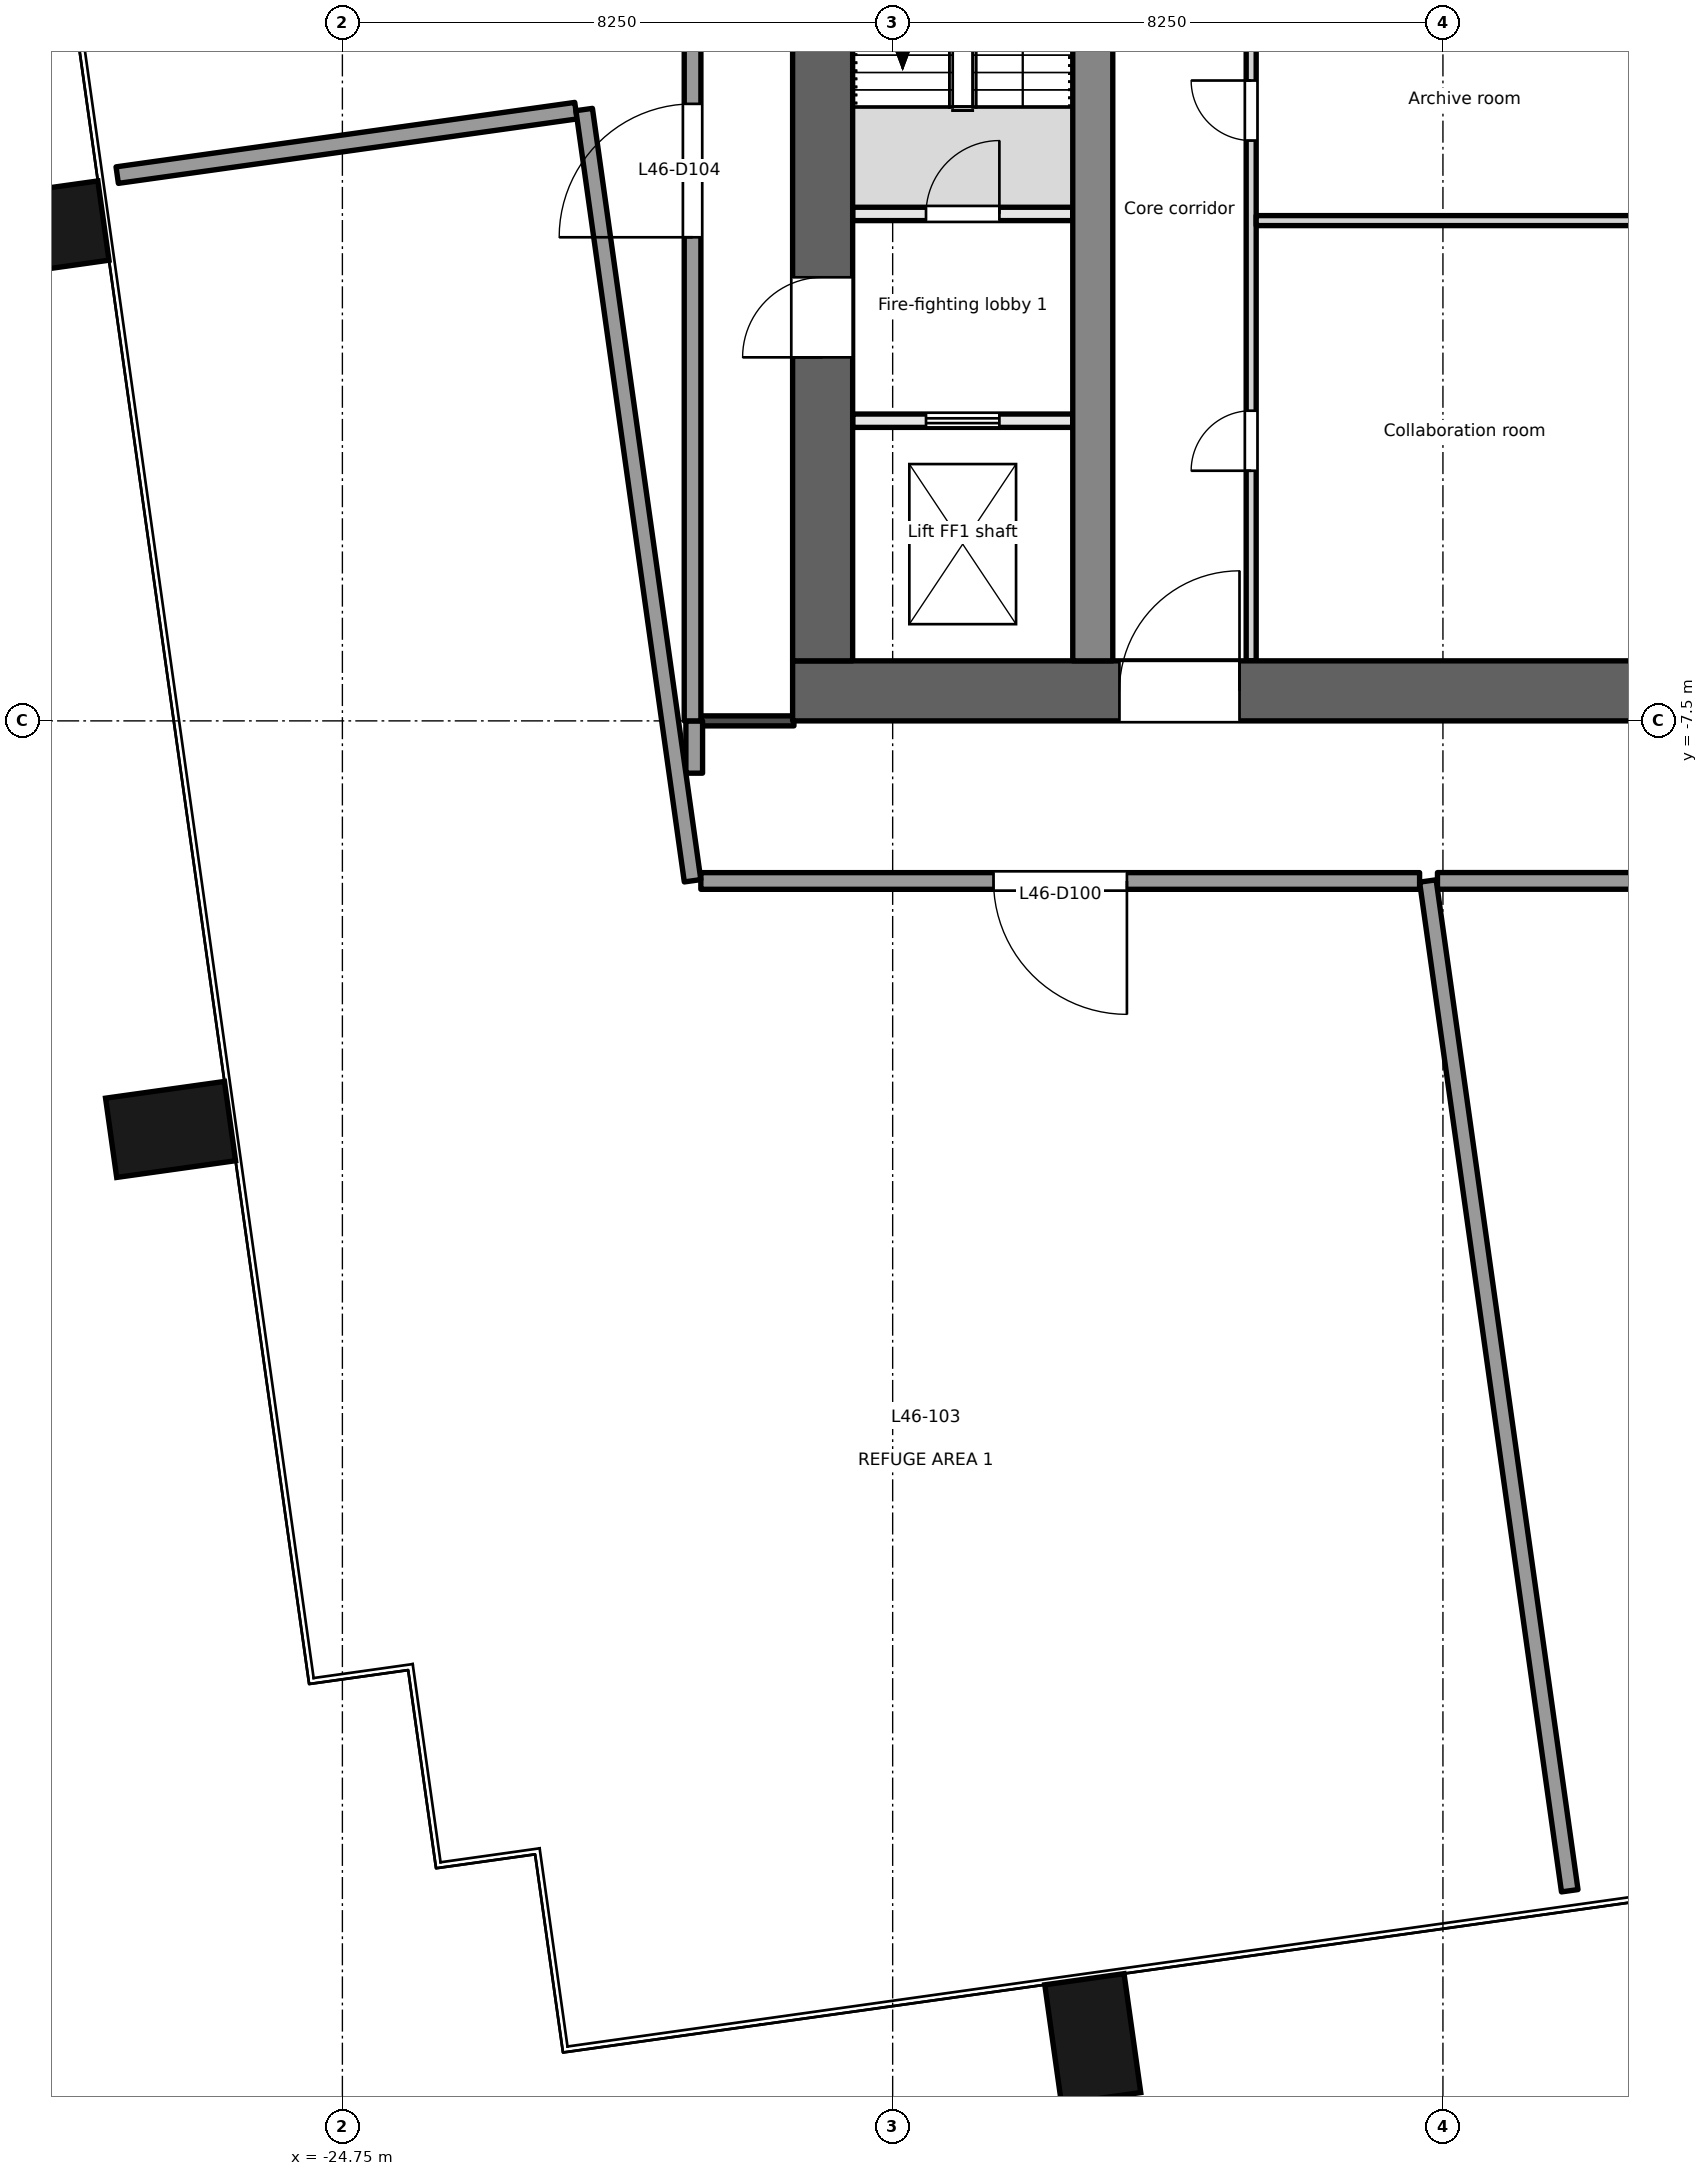
"""IFC4 building model, lengths in metres.
Left out: names, types, materials, properties, quantities, classifications, styles, units other than length and angle.
Written with IfcOpenShell. Run it as: python <this file> out.ifc"""

import sys

from ifc_helpers import new_model, si_unit, direction, frame, frame_2d, origin, origin_2d, place, context, subcontext, project, spatial, rectangle, extrude, element, fill, save


model = new_model("IFC4")
c1 = context("Model", 3, precision=1e-05, world=origin(), true_north=direction((0.0, 1.0)))
c2 = subcontext(c1, "Body", "Model", "MODEL_VIEW")
j1 = project(units=[si_unit("LENGTHUNIT", "METRE"), si_unit("PLANEANGLEUNIT", "RADIAN")], contexts=[c1])
p1 = place(None, origin())
s1 = spatial("IfcSite", under=j1, at=p1, CompositionType="ELEMENT")
p2 = place(p1, origin())
s2 = spatial("IfcBuilding", under=s1, at=p2, CompositionType="ELEMENT")
p3 = place(p2, frame((0.0, 0.0, 199.7)))
s3 = spatial("IfcBuildingStorey", under=s2, at=p3, CompositionType="ELEMENT", Elevation=199.7)
for number, where, z_axis, x_axis in (
    (1, (-13.5, -27.256, -0.2), (0.0, 0.0, 1.0), (0.99, 0.139, 0.0)),
    (2, (-27.326, -13.625, -0.2), (0.0, 0.0, 1.0), (-0.139, 0.99, 0.0)),
    (3, (-29.224, -0.125, -0.2), (0.0, 0.0, 1.0), (-0.139, 0.99, 0.0)),
):
    element("IfcColumn", number, at=place(p3, frame(where, z_axis=z_axis, x_axis=x_axis)), inside=s3, PredefinedType="COLUMN", context=c2, shape_type="SweptSolid", body=[
        extrude(rectangle(XDim=1.2, YDim=1.8, at=origin_2d()), origin(), (0.0, 0.0, 1.0), 8.4),
    ])
p4 = place(p3, frame((-18.0, -7.05, -0.2), z_axis=(0.0, 0.0, 1.0), x_axis=(1.0, 0.0, 0.0)))
e4 = element("IfcWall", 4, at=p4, inside=s3, PredefinedType="SHEAR", context=c2, shape_type="SweptSolid", body=[
    extrude(rectangle(XDim=36.0, YDim=0.9, at=frame_2d((18.0, 0.0))), origin(), (0.0, 0.0, 1.0), 8.4),
])
p5 = place(p4, frame((4.9, 0.0, 0.2)))
e5 = element("IfcOpeningElement", 5, at=p5, cuts=e4, PredefinedType="OPENING", context=c2, shape_type="SweptSolid", body=[
    extrude(rectangle(XDim=1.8, YDim=2.1, at=frame_2d((0.9, 1.05))), frame((0.0, 0.46, 0.0), z_axis=(0.0, -1.0, 0.0), x_axis=(1.0, 0.0, 0.0)), (0.0, 0.0, 1.0), 0.921),
])
p6 = place(p4, frame((17.4, 0.0, 0.2)))
e6 = element("IfcOpeningElement", 6, at=p6, cuts=e4, PredefinedType="OPENING", context=c2, shape_type="SweptSolid", body=[
    extrude(rectangle(XDim=1.2, YDim=2.1, at=frame_2d((0.6, 1.05))), frame((0.0, 0.46, 0.0), z_axis=(0.0, -1.0, 0.0), x_axis=(1.0, 0.0, 0.0)), (0.0, 0.0, 1.0), 0.921),
])
p7 = place(p4, frame((26.1, 0.0, 0.2)))
e7 = element("IfcOpeningElement", 7, at=p7, cuts=e4, PredefinedType="OPENING", context=c2, shape_type="SweptSolid", body=[
    extrude(rectangle(XDim=2.4, YDim=2.1, at=frame_2d((1.2, 1.05))), frame((0.0, 0.46, 0.0), z_axis=(0.0, -1.0, 0.0), x_axis=(1.0, 0.0, 0.0)), (0.0, 0.0, 1.0), 0.921),
])
p8 = place(p3, frame((-17.55, -6.6, -0.2), z_axis=(0.0, 0.0, 1.0), x_axis=(0.0, 1.0, 0.0)))
e8 = element("IfcWall", 8, at=p8, inside=s3, PredefinedType="SHEAR", context=c2, shape_type="SweptSolid", body=[
    extrude(rectangle(XDim=13.2, YDim=0.9, at=frame_2d((6.6, 0.0))), origin(), (0.0, 0.0, 1.0), 8.4),
])
p9 = place(p8, frame((4.55, 0.0, 0.2)))
e9 = element("IfcOpeningElement", 9, at=p9, cuts=e8, PredefinedType="OPENING", context=c2, shape_type="SweptSolid", body=[
    extrude(rectangle(XDim=1.2, YDim=2.1, at=frame_2d((0.6, 1.05))), frame((0.0, 0.46, 0.0), z_axis=(0.0, -1.0, 0.0), x_axis=(1.0, 0.0, 0.0)), (0.0, 0.0, 1.0), 0.921),
])
p10 = place(p3, frame((-13.5, -6.6, -0.2), z_axis=(0.0, 0.0, 1.0), x_axis=(0.0, 1.0, 0.0)))
e10 = element("IfcWall", 10, at=p10, inside=s3, PredefinedType="SHEAR", context=c2, shape_type="SweptSolid", body=[
    extrude(rectangle(XDim=13.2, YDim=0.6, at=frame_2d((6.6, 0.0))), origin(), (0.0, 0.0, 1.0), 8.4),
])
p11 = place(p3, frame((-17.1, -3.0, 0.0), z_axis=(0.0, 0.0, 1.0), x_axis=(1.0, 0.0, 0.0)))
e11 = element("IfcWall", 11, at=p11, inside=s3, PredefinedType="PARTITIONING", context=c2, shape_type="SweptSolid", body=[
    extrude(rectangle(XDim=3.3, YDim=0.2, at=frame_2d((1.65, 0.0))), origin(), (0.0, 0.0, 1.0), 8.2),
])
p12 = place(p11, frame((1.1, 0.0, 0.0)))
e12 = element("IfcOpeningElement", 12, at=p12, cuts=e11, PredefinedType="OPENING", context=c2, shape_type="SweptSolid", body=[
    extrude(rectangle(XDim=1.1, YDim=2.1, at=frame_2d((0.55, 1.05))), frame((0.0, 0.111, 0.0), z_axis=(0.0, -1.0, 0.0), x_axis=(1.0, 0.0, 0.0)), (0.0, 0.0, 1.0), 0.221),
])
p13 = place(p3, frame((-17.1, 0.1, 0.0), z_axis=(0.0, 0.0, 1.0), x_axis=(1.0, 0.0, 0.0)))
e13 = element("IfcWall", 13, at=p13, inside=s3, PredefinedType="PARTITIONING", context=c2, shape_type="SweptSolid", body=[
    extrude(rectangle(XDim=3.3, YDim=0.2, at=frame_2d((1.65, 0.0))), origin(), (0.0, 0.0, 1.0), 8.2),
])
p14 = place(p13, frame((1.1, 0.0, 0.0)))
e14 = element("IfcOpeningElement", 14, at=p14, cuts=e13, PredefinedType="OPENING", context=c2, shape_type="SweptSolid", body=[
    extrude(rectangle(XDim=1.1, YDim=2.1, at=frame_2d((0.55, 1.05))), frame((0.0, 0.111, 0.0), z_axis=(0.0, -1.0, 0.0), x_axis=(1.0, 0.0, 0.0)), (0.0, 0.0, 1.0), 0.221),
])
p15 = place(p3, frame((-11.125, -6.6, 0.0), z_axis=(0.0, 0.0, 1.0), x_axis=(0.0, 1.0, 0.0)))
e15 = element("IfcWall", 15, at=p15, inside=s3, PredefinedType="PARTITIONING", context=c2, shape_type="SweptSolid", body=[
    extrude(rectangle(XDim=13.2, YDim=0.15, at=frame_2d((6.6, 0.0))), origin(), (0.0, 0.0, 1.0), 8.2),
])
p16 = place(p15, frame((2.85, 0.0, 0.0)))
e16 = element("IfcOpeningElement", 16, at=p16, cuts=e15, PredefinedType="OPENING", context=c2, shape_type="SweptSolid", body=[
    extrude(rectangle(XDim=0.9, YDim=2.1, at=frame_2d((0.45, 1.05))), frame((0.0, 0.085, 0.0), z_axis=(0.0, -1.0, 0.0), x_axis=(1.0, 0.0, 0.0)), (0.0, 0.0, 1.0), 0.171),
])
p17 = place(p15, frame((7.8, 0.0, 0.0)))
e17 = element("IfcOpeningElement", 17, at=p17, cuts=e15, PredefinedType="OPENING", context=c2, shape_type="SweptSolid", body=[
    extrude(rectangle(XDim=0.9, YDim=2.1, at=frame_2d((0.45, 1.05))), frame((0.0, 0.085, 0.0), z_axis=(0.0, -1.0, 0.0), x_axis=(1.0, 0.0, 0.0)), (0.0, 0.0, 1.0), 0.171),
])
p18 = place(p15, frame((11.1, 0.0, 0.0)))
e18 = element("IfcOpeningElement", 18, at=p18, cuts=e15, PredefinedType="OPENING", context=c2, shape_type="SweptSolid", body=[
    extrude(rectangle(XDim=0.9, YDim=2.1, at=frame_2d((0.45, 1.05))), frame((0.0, 0.085, 0.0), z_axis=(0.0, -1.0, 0.0), x_axis=(1.0, 0.0, 0.0)), (0.0, 0.0, 1.0), 0.171),
])
p19 = place(p3, frame((-11.05, 0.0, 0.0), z_axis=(0.0, 0.0, 1.0), x_axis=(1.0, 0.0, 0.0)))
e19 = element("IfcWall", 19, at=p19, inside=s3, PredefinedType="PARTITIONING", context=c2, shape_type="SweptSolid", body=[
    extrude(rectangle(XDim=6.25, YDim=0.15, at=frame_2d((3.125, 0.0))), origin(), (0.0, 0.0, 1.0), 8.2),
])
p20 = place(p3, frame((-19.375, -7.5, 0.0), z_axis=(0.0, 0.0, 1.0), x_axis=(1.0, 0.0, 0.0)))
e20 = element("IfcWall", 20, at=p20, inside=s3, PredefinedType="PARTITIONING", context=c2, shape_type="SweptSolid", body=[
    extrude(rectangle(XDim=1.395, YDim=0.15, at=frame_2d((0.698, 0.0))), origin(), (0.0, 0.0, 1.0), 8.2),
])
p21 = place(p3, frame((-8.6, -9.9, 0.0), z_axis=(0.0, 0.0, 1.0), x_axis=(-1.0, 0.0, 0.0)))
e21 = element("IfcWall", 21, at=p21, inside=s3, PredefinedType="PARTITIONING", context=c2, shape_type="SweptSolid", body=[
    extrude(rectangle(XDim=10.776, YDim=0.25, at=frame_2d((5.388, 0.0))), origin(), (0.0, 0.0, 1.0), 7.3),
])
p22 = place(p21, frame((4.388, 0.0, 0.0)))
e22 = element("IfcOpeningElement", 22, at=p22, cuts=e21, PredefinedType="OPENING", context=c2, shape_type="SweptSolid", body=[
    extrude(rectangle(XDim=2.0, YDim=2.1, at=frame_2d((1.0, 1.05))), frame((0.0, 0.135, 0.0), z_axis=(0.0, -1.0, 0.0), x_axis=(1.0, 0.0, 0.0)), (0.0, 0.0, 1.0), 0.271),
])
p23 = place(p3, frame((0.705, -9.899, 0.0), z_axis=(0.0, 0.0, 1.0), x_axis=(-1.0, 0.0, 0.0)))
e23 = element("IfcWall", 23, at=p23, inside=s3, PredefinedType="PARTITIONING", context=c2, shape_type="SweptSolid", body=[
    extrude(rectangle(XDim=9.037, YDim=0.25, at=frame_2d((4.519, 0.0))), origin(), (0.0, 0.0, 1.0), 7.3),
])
p24 = place(p23, frame((3.519, 0.0, 0.0)))
e24 = element("IfcOpeningElement", 24, at=p24, cuts=e23, PredefinedType="OPENING", context=c2, shape_type="SweptSolid", body=[
    extrude(rectangle(XDim=2.0, YDim=2.1, at=frame_2d((1.0, 1.05))), frame((0.0, 0.135, 0.0), z_axis=(0.0, -1.0, 0.0), x_axis=(1.0, 0.0, 0.0)), (0.0, 0.0, 1.0), 0.271),
])
p25 = place(p3, frame((-19.475, -8.284, 0.0), z_axis=(0.0, 0.0, 1.0), x_axis=(0.0, 1.0, 0.0)))
e25 = element("IfcWall", 25, at=p25, inside=s3, PredefinedType="PARTITIONING", context=c2, shape_type="SweptSolid", body=[
    extrude(rectangle(XDim=0.784, YDim=0.25, at=frame_2d((0.392, 0.0))), origin(), (0.0, 0.0, 1.0), 8.2),
])
p26 = place(p3, frame((-19.5, -7.5, 0.0), z_axis=(0.0, 0.0, 1.0), x_axis=(0.0, 1.0, 0.0)))
e26 = element("IfcWall", 26, at=p26, inside=s3, PredefinedType="PARTITIONING", context=c2, shape_type="SweptSolid", body=[
    extrude(rectangle(XDim=16.5, YDim=0.25, at=frame_2d((8.25, 0.0))), origin(), (0.0, 0.0, 1.0), 6.15),
])
p27 = place(p26, frame((7.25, 0.0, 0.0)))
e27 = element("IfcOpeningElement", 27, at=p27, cuts=e26, PredefinedType="OPENING", context=c2, shape_type="SweptSolid", body=[
    extrude(rectangle(XDim=2.0, YDim=2.1, at=frame_2d((1.0, 1.05))), frame((0.0, 0.135, 0.0), z_axis=(0.0, -1.0, 0.0), x_axis=(1.0, 0.0, 0.0)), (0.0, 0.0, 1.0), 0.271),
])
p28 = place(p3, frame((-8.476, -9.9, 0.0), z_axis=(0.0, 0.0, 1.0), x_axis=(0.139135905406, -0.990273295523, 0.0)))
e28 = element("IfcWall", 28, at=p28, inside=s3, PredefinedType="PARTITIONING", context=c2, shape_type="SweptSolid", body=[
    extrude(rectangle(XDim=15.287, YDim=0.25, at=frame_2d((7.644, 0.0))), origin(), (0.0, 0.0, 1.0), 8.2),
])
p29 = place(p3, frame((-28.126, 0.682, 0.0), z_axis=(0.0, 0.0, 1.0), x_axis=(0.990276566438, 0.13911262331, 0.0)))
e29 = element("IfcWall", 29, at=p29, inside=s3, PredefinedType="PARTITIONING", context=c2, shape_type="SweptSolid", body=[
    extrude(rectangle(XDim=6.945, YDim=0.25, at=frame_2d((3.472, 0.0))), origin(), (0.0, 0.0, 1.0), 7.1),
])
p30 = place(p3, frame((-21.125, 1.665, 0.0), z_axis=(0.0, 0.0, 1.0), x_axis=(0.139178578933, -0.990267298847, 0.0)))
e30 = element("IfcWall", 30, at=p30, inside=s3, PredefinedType="PARTITIONING", context=c2, shape_type="SweptSolid", body=[
    extrude(rectangle(XDim=11.676, YDim=0.25, at=frame_2d((5.838, 0.0))), origin(), (0.0, 0.0, 1.0), 6.15),
])
p31 = place(p12, origin())
e31 = element("IfcDoor", 31, at=p31, inside=s3, OperationType="DOUBLE_DOOR_SLIDING", PredefinedType="DOOR", context=c2, shape_type="SweptSolid", body=[
    extrude(rectangle(XDim=1.1, YDim=2.1, at=frame_2d((0.55, 1.05))), frame((0.0, 0.025, 0.0), z_axis=(0.0, -1.0, 0.0), x_axis=(1.0, 0.0, 0.0)), (0.0, 0.0, 1.0), 0.05),
])
fill(e12, e31)
p32 = place(p9, origin())
e32 = element("IfcDoor", 32, at=p32, inside=s3, OperationType="SINGLE_SWING_LEFT", PredefinedType="DOOR", context=c2, shape_type="SweptSolid", body=[
    extrude(rectangle(XDim=1.2, YDim=2.1, at=frame_2d((0.6, 1.05))), frame((0.0, 0.025, 0.0), z_axis=(0.0, -1.0, 0.0), x_axis=(1.0, 0.0, 0.0)), (0.0, 0.0, 1.0), 0.05),
])
fill(e9, e32)
p33 = place(p14, origin())
e33 = element("IfcDoor", 33, at=p33, inside=s3, OperationType="SINGLE_SWING_RIGHT", PredefinedType="DOOR", context=c2, shape_type="SweptSolid", body=[
    extrude(rectangle(XDim=1.1, YDim=2.1, at=frame_2d((0.55, 1.05))), frame((0.0, 0.025, 0.0), z_axis=(0.0, -1.0, 0.0), x_axis=(1.0, 0.0, 0.0)), (0.0, 0.0, 1.0), 0.05),
])
fill(e14, e33)
p34 = place(p16, origin())
e34 = element("IfcDoor", 34, at=p34, inside=s3, OperationType="SINGLE_SWING_LEFT", PredefinedType="DOOR", context=c2, shape_type="SweptSolid", body=[
    extrude(rectangle(XDim=0.9, YDim=2.1, at=frame_2d((0.45, 1.05))), frame((0.0, 0.025, 0.0), z_axis=(0.0, -1.0, 0.0), x_axis=(1.0, 0.0, 0.0)), (0.0, 0.0, 1.0), 0.05),
])
fill(e16, e34)
p35 = place(p17, origin())
e35 = element("IfcDoor", 35, at=p35, inside=s3, OperationType="SINGLE_SWING_RIGHT", PredefinedType="DOOR", context=c2, shape_type="SweptSolid", body=[
    extrude(rectangle(XDim=0.9, YDim=2.1, at=frame_2d((0.45, 1.05))), frame((0.0, 0.025, 0.0), z_axis=(0.0, -1.0, 0.0), x_axis=(1.0, 0.0, 0.0)), (0.0, 0.0, 1.0), 0.05),
])
fill(e17, e35)
p36 = place(p5, origin())
e36 = element("IfcDoor", 36, at=p36, inside=s3, OperationType="SINGLE_SWING_RIGHT", PredefinedType="DOOR", context=c2, shape_type="SweptSolid", body=[
    extrude(rectangle(XDim=1.8, YDim=2.1, at=frame_2d((0.9, 1.05))), frame((0.0, 0.025, 0.0), z_axis=(0.0, -1.0, 0.0), x_axis=(1.0, 0.0, 0.0)), (0.0, 0.0, 1.0), 0.05),
])
fill(e5, e36)
p37 = place(p22, origin())
e37 = element("IfcDoor", 37, at=p37, inside=s3, OperationType="DOUBLE_DOOR_SINGLE_SWING", PredefinedType="DOOR", context=c2, shape_type="SweptSolid", body=[
    extrude(rectangle(XDim=2.0, YDim=2.1, at=frame_2d((1.0, 1.05))), frame((0.0, 0.025, 0.0), z_axis=(0.0, -1.0, 0.0), x_axis=(1.0, 0.0, 0.0)), (0.0, 0.0, 1.0), 0.05),
])
fill(e22, e37)
p38 = place(p27, origin())
e38 = element("IfcDoor", 38, at=p38, inside=s3, OperationType="DOUBLE_DOOR_SINGLE_SWING", PredefinedType="DOOR", context=c2, shape_type="SweptSolid", body=[
    extrude(rectangle(XDim=2.0, YDim=2.1, at=frame_2d((1.0, 1.05))), frame((0.0, 0.025, 0.0), z_axis=(0.0, -1.0, 0.0), x_axis=(1.0, 0.0, 0.0)), (0.0, 0.0, 1.0), 0.05),
])
fill(e27, e38)
save(model, sys.argv[1])
